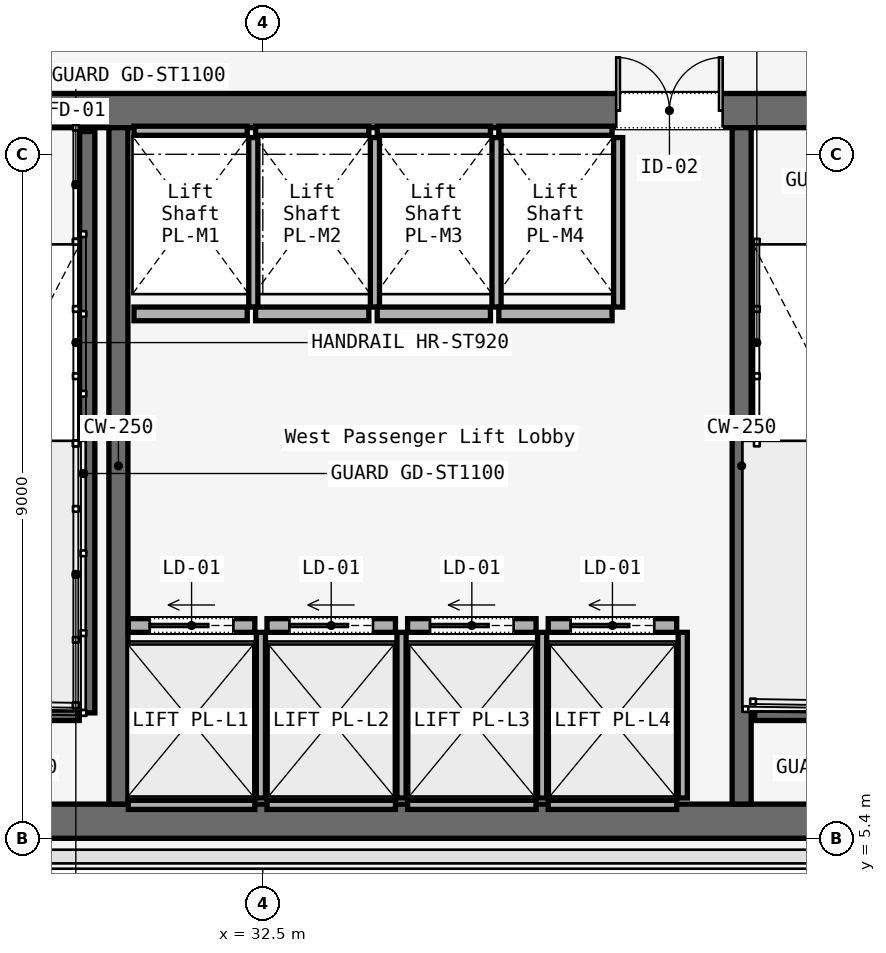
"""IFC4 building model, lengths in metres.
Left out: names, types, materials, properties, quantities, classifications, styles, units other than length and angle.
Written with IfcOpenShell. Run it as: python <this file> out.ifc"""

import sys

from ifc_helpers import new_model, si_unit, direction, frame, frame_2d, origin, place, context, subcontext, project, spatial, rectangle, extrude, element, fill, save


model = new_model("IFC4")
c1 = context("Model", 3, precision=1e-05, world=origin(), true_north=direction((0.0, 1.0)))
c2 = subcontext(c1, "Body", "Model", "MODEL_VIEW")
j1 = project(units=[si_unit("LENGTHUNIT", "METRE"), si_unit("PLANEANGLEUNIT", "RADIAN")], contexts=[c1])
p1 = place(None, origin())
s1 = spatial("IfcSite", under=j1, at=p1, CompositionType="ELEMENT")
p2 = place(p1, origin())
s2 = spatial("IfcBuilding", under=s1, at=p2, CompositionType="ELEMENT")
p3 = place(p2, frame((0.0, 0.0, 85.4)))
s3 = spatial("IfcBuildingStorey", under=s2, at=p3, CompositionType="ELEMENT", Elevation=85.4)
p4 = place(p3, frame((26.45, 14.975, 0.0), z_axis=(0.0, 0.0, 1.0), x_axis=(1.0, 0.0, 0.0)))
e1 = element("IfcWall", 1, at=p4, inside=s3, PredefinedType="SOLIDWALL", context=c2, shape_type="SweptSolid", body=[
    extrude(rectangle(XDim=31.1, YDim=0.45, at=frame_2d((15.55, 0.0))), origin(), (0.0, 0.0, 1.0), 3.58),
])
p5 = place(p4, frame((1.65, 0.0, 0.0)))
e2 = element("IfcOpeningElement", 2, at=p5, cuts=e1, PredefinedType="OPENING", context=c2, shape_type="SweptSolid", body=[
    extrude(rectangle(XDim=1.1, YDim=2.2, at=frame_2d((0.55, 1.1))), frame((0.0, 0.225, 0.0), z_axis=(0.0, -1.0, 0.0), x_axis=(1.0, 0.0, 0.0)), (0.0, 0.0, 1.0), 0.45),
])
p6 = place(p4, frame((13.65, 0.0, 0.0)))
e3 = element("IfcOpeningElement", 3, at=p6, cuts=e1, PredefinedType="OPENING", context=c2, shape_type="SweptSolid", body=[
    extrude(rectangle(XDim=1.1, YDim=2.2, at=frame_2d((0.55, 1.1))), frame((0.0, 0.225, 0.0), z_axis=(0.0, -1.0, 0.0), x_axis=(1.0, 0.0, 0.0)), (0.0, 0.0, 1.0), 0.45),
])
p7 = place(p4, frame((25.55, 0.0, 0.0)))
e4 = element("IfcOpeningElement", 4, at=p7, cuts=e1, PredefinedType="OPENING", context=c2, shape_type="SweptSolid", body=[
    extrude(rectangle(XDim=1.1, YDim=2.2, at=frame_2d((0.55, 1.1))), frame((0.0, 0.225, 0.0), z_axis=(0.0, -1.0, 0.0), x_axis=(1.0, 0.0, 0.0)), (0.0, 0.0, 1.0), 0.45),
])
p8 = place(p4, frame((10.7, 0.0, 0.0)))
e5 = element("IfcOpeningElement", 5, at=p8, cuts=e1, PredefinedType="OPENING", context=c2, shape_type="SweptSolid", body=[
    extrude(rectangle(XDim=1.4, YDim=2.2, at=frame_2d((0.7, 1.1))), frame((0.0, 0.225, 0.0), z_axis=(0.0, -1.0, 0.0), x_axis=(1.0, 0.0, 0.0)), (0.0, 0.0, 1.0), 0.45),
])
p9 = place(p4, frame((19.35, 0.0, 0.0)))
e6 = element("IfcOpeningElement", 6, at=p9, cuts=e1, PredefinedType="OPENING", context=c2, shape_type="SweptSolid", body=[
    extrude(rectangle(XDim=1.1, YDim=2.2, at=frame_2d((0.55, 1.1))), frame((0.0, 0.225, 0.0), z_axis=(0.0, -1.0, 0.0), x_axis=(1.0, 0.0, 0.0)), (0.0, 0.0, 1.0), 0.45),
])
p10 = place(p4, frame((21.4, 0.0, 0.0)))
e7 = element("IfcOpeningElement", 7, at=p10, cuts=e1, PredefinedType="OPENING", context=c2, shape_type="SweptSolid", body=[
    extrude(rectangle(XDim=0.9, YDim=2.1, at=frame_2d((0.45, 1.05))), frame((0.0, 0.225, 0.0), z_axis=(0.0, -1.0, 0.0), x_axis=(1.0, 0.0, 0.0)), (0.0, 0.0, 1.0), 0.45),
])
p11 = place(p4, frame((23.35, 0.0, 0.0)))
e8 = element("IfcOpeningElement", 8, at=p11, cuts=e1, PredefinedType="OPENING", context=c2, shape_type="SweptSolid", body=[
    extrude(rectangle(XDim=1.3, YDim=2.3, at=frame_2d((0.65, 1.15))), frame((0.0, 0.225, 0.0), z_axis=(0.0, -1.0, 0.0), x_axis=(1.0, 0.0, 0.0)), (0.0, 0.0, 1.0), 0.45),
])
p12 = place(p3, frame((26.45, 5.625, 0.0), z_axis=(0.0, 0.0, 1.0), x_axis=(1.0, 0.0, 0.0)))
e9 = element("IfcWall", 9, at=p12, inside=s3, PredefinedType="SOLIDWALL", context=c2, shape_type="SweptSolid", body=[
    extrude(rectangle(XDim=31.1, YDim=0.45, at=frame_2d((15.55, 0.0))), origin(), (0.0, 0.0, 1.0), 3.58),
])
for number, where, z_axis, x_axis in (
    (10, (30.6, 5.85, 0.0), (0.0, 0.0, 1.0), (0.0, 1.0, 0.0)),
    (11, (38.8, 5.85, 0.0), (0.0, 0.0, 1.0), (0.0, 1.0, 0.0)),
):
    element("IfcWall", number, at=place(p3, frame(where, z_axis=z_axis, x_axis=x_axis)), inside=s3, PredefinedType="SOLIDWALL", context=c2, shape_type="SweptSolid", body=[
        extrude(rectangle(XDim=8.9, YDim=0.25, at=frame_2d((4.45, 0.0))), origin(), (0.0, 0.0, 1.0), 3.58),
    ])
p13 = place(p3, frame((30.19, 14.7, 0.0), z_axis=(0.0, 0.0, 1.0), x_axis=(0.0, -1.0, 0.0)))
e12 = element("IfcWall", 12, at=p13, inside=s3, PredefinedType="SOLIDWALL", context=c2, shape_type="SweptSolid", body=[
    extrude(rectangle(XDim=7.65, YDim=0.2, at=frame_2d((3.825, 0.0))), origin(), (0.0, 0.0, 1.0), 3.8),
])
for number, where, z_axis, x_axis in (
    (13, (26.97, 7.05, 0.0), (0.0, 0.0, 1.0), (1.0, 0.0, 0.0)),
    (14, (38.97, 7.05, 0.0), (0.0, 0.0, 1.0), (1.0, 0.0, 0.0)),
):
    element("IfcWall", number, at=place(p3, frame(where, z_axis=z_axis, x_axis=x_axis)), inside=s3, PredefinedType="SOLIDWALL", context=c2, shape_type="SweptSolid", body=[
        extrude(rectangle(XDim=3.115, YDim=0.2, at=frame_2d((1.558, 0.0))), origin(), (0.0, 0.0, 1.0), 3.8),
    ])
p14 = place(p3, frame((30.73, 8.2, 0.0), z_axis=(0.0, 0.0, 1.0), x_axis=(1.0, 0.0, 0.0)))
e15 = element("IfcWall", 15, at=p14, inside=s3, PredefinedType="SOLIDWALL", context=c2, shape_type="SweptSolid", body=[
    extrude(rectangle(XDim=1.665, YDim=0.18, at=frame_2d((0.833, 0.0))), origin(), (0.0, 0.0, 1.0), 2.95),
])
p15 = place(p14, frame((0.282, 0.0, 0.0)))
e16 = element("IfcOpeningElement", 16, at=p15, cuts=e15, PredefinedType="OPENING", context=c2, shape_type="SweptSolid", body=[
    extrude(rectangle(XDim=1.1, YDim=2.2, at=frame_2d((0.55, 1.1))), frame((0.0, 0.09, 0.0), z_axis=(0.0, -1.0, 0.0), x_axis=(1.0, 0.0, 0.0)), (0.0, 0.0, 1.0), 0.18),
])
p16 = place(p3, frame((30.73, 5.84, 0.0), z_axis=(0.0, 0.0, 1.0), x_axis=(1.0, 0.0, 0.0)))
e17 = element("IfcWall", 17, at=p16, inside=s3, PredefinedType="SOLIDWALL", context=c2, shape_type="SweptSolid", body=[
    extrude(rectangle(XDim=1.665, YDim=0.12, at=frame_2d((0.833, 0.0))), origin(), (0.0, 0.0, 1.0), 2.95),
])
p17 = place(p3, frame((32.475, 5.93, 0.0), z_axis=(0.0, 0.0, 1.0), x_axis=(0.0, 1.0, 0.0)))
e18 = element("IfcWall", 18, at=p17, inside=s3, PredefinedType="SOLIDWALL", context=c2, shape_type="SweptSolid", body=[
    extrude(rectangle(XDim=2.18, YDim=0.12, at=frame_2d((1.09, 0.0))), origin(), (0.0, 0.0, 1.0), 2.95),
])
p18 = place(p3, frame((32.555, 8.2, 0.0), z_axis=(0.0, 0.0, 1.0), x_axis=(1.0, 0.0, 0.0)))
e19 = element("IfcWall", 19, at=p18, inside=s3, PredefinedType="SOLIDWALL", context=c2, shape_type="SweptSolid", body=[
    extrude(rectangle(XDim=1.69, YDim=0.18, at=frame_2d((0.845, 0.0))), origin(), (0.0, 0.0, 1.0), 2.95),
])
p19 = place(p18, frame((0.295, 0.0, 0.0)))
e20 = element("IfcOpeningElement", 20, at=p19, cuts=e19, PredefinedType="OPENING", context=c2, shape_type="SweptSolid", body=[
    extrude(rectangle(XDim=1.1, YDim=2.2, at=frame_2d((0.55, 1.1))), frame((0.0, 0.09, 0.0), z_axis=(0.0, -1.0, 0.0), x_axis=(1.0, 0.0, 0.0)), (0.0, 0.0, 1.0), 0.18),
])
p20 = place(p3, frame((32.555, 5.84, 0.0), z_axis=(0.0, 0.0, 1.0), x_axis=(1.0, 0.0, 0.0)))
e21 = element("IfcWall", 21, at=p20, inside=s3, PredefinedType="SOLIDWALL", context=c2, shape_type="SweptSolid", body=[
    extrude(rectangle(XDim=1.69, YDim=0.12, at=frame_2d((0.845, 0.0))), origin(), (0.0, 0.0, 1.0), 2.95),
])
p21 = place(p3, frame((34.325, 5.93, 0.0), z_axis=(0.0, 0.0, 1.0), x_axis=(0.0, 1.0, 0.0)))
e22 = element("IfcWall", 22, at=p21, inside=s3, PredefinedType="SOLIDWALL", context=c2, shape_type="SweptSolid", body=[
    extrude(rectangle(XDim=2.18, YDim=0.12, at=frame_2d((1.09, 0.0))), origin(), (0.0, 0.0, 1.0), 2.95),
])
p22 = place(p3, frame((34.405, 8.2, 0.0), z_axis=(0.0, 0.0, 1.0), x_axis=(1.0, 0.0, 0.0)))
e23 = element("IfcWall", 23, at=p22, inside=s3, PredefinedType="SOLIDWALL", context=c2, shape_type="SweptSolid", body=[
    extrude(rectangle(XDim=1.69, YDim=0.18, at=frame_2d((0.845, 0.0))), origin(), (0.0, 0.0, 1.0), 2.95),
])
p23 = place(p22, frame((0.295, 0.0, 0.0)))
e24 = element("IfcOpeningElement", 24, at=p23, cuts=e23, PredefinedType="OPENING", context=c2, shape_type="SweptSolid", body=[
    extrude(rectangle(XDim=1.1, YDim=2.2, at=frame_2d((0.55, 1.1))), frame((0.0, 0.09, 0.0), z_axis=(0.0, -1.0, 0.0), x_axis=(1.0, 0.0, 0.0)), (0.0, 0.0, 1.0), 0.18),
])
p24 = place(p3, frame((34.405, 5.84, 0.0), z_axis=(0.0, 0.0, 1.0), x_axis=(1.0, 0.0, 0.0)))
e25 = element("IfcWall", 25, at=p24, inside=s3, PredefinedType="SOLIDWALL", context=c2, shape_type="SweptSolid", body=[
    extrude(rectangle(XDim=1.69, YDim=0.12, at=frame_2d((0.845, 0.0))), origin(), (0.0, 0.0, 1.0), 2.95),
])
p25 = place(p3, frame((36.175, 5.93, 0.0), z_axis=(0.0, 0.0, 1.0), x_axis=(0.0, 1.0, 0.0)))
e26 = element("IfcWall", 26, at=p25, inside=s3, PredefinedType="SOLIDWALL", context=c2, shape_type="SweptSolid", body=[
    extrude(rectangle(XDim=2.18, YDim=0.12, at=frame_2d((1.09, 0.0))), origin(), (0.0, 0.0, 1.0), 2.95),
])
p26 = place(p3, frame((36.255, 8.2, 0.0), z_axis=(0.0, 0.0, 1.0), x_axis=(1.0, 0.0, 0.0)))
e27 = element("IfcWall", 27, at=p26, inside=s3, PredefinedType="SOLIDWALL", context=c2, shape_type="SweptSolid", body=[
    extrude(rectangle(XDim=1.69, YDim=0.18, at=frame_2d((0.845, 0.0))), origin(), (0.0, 0.0, 1.0), 2.95),
])
p27 = place(p26, frame((0.295, 0.0, 0.0)))
e28 = element("IfcOpeningElement", 28, at=p27, cuts=e27, PredefinedType="OPENING", context=c2, shape_type="SweptSolid", body=[
    extrude(rectangle(XDim=1.1, YDim=2.2, at=frame_2d((0.55, 1.1))), frame((0.0, 0.09, 0.0), z_axis=(0.0, -1.0, 0.0), x_axis=(1.0, 0.0, 0.0)), (0.0, 0.0, 1.0), 0.18),
])
p28 = place(p3, frame((36.255, 5.84, 0.0), z_axis=(0.0, 0.0, 1.0), x_axis=(1.0, 0.0, 0.0)))
e29 = element("IfcWall", 29, at=p28, inside=s3, PredefinedType="SOLIDWALL", context=c2, shape_type="SweptSolid", body=[
    extrude(rectangle(XDim=1.69, YDim=0.12, at=frame_2d((0.845, 0.0))), origin(), (0.0, 0.0, 1.0), 2.95),
])
p29 = place(p3, frame((38.025, 5.93, 0.0), z_axis=(0.0, 0.0, 1.0), x_axis=(0.0, 1.0, 0.0)))
e30 = element("IfcWall", 30, at=p29, inside=s3, PredefinedType="SOLIDWALL", context=c2, shape_type="SweptSolid", body=[
    extrude(rectangle(XDim=2.18, YDim=0.12, at=frame_2d((1.09, 0.0))), origin(), (0.0, 0.0, 1.0), 2.95),
])
p30 = place(p3, frame((30.805, 12.3, 0.0), z_axis=(0.0, 0.0, 1.0), x_axis=(1.0, 0.0, 0.0)))
e31 = element("IfcWall", 31, at=p30, inside=s3, PredefinedType="SOLIDWALL", context=c2, shape_type="SweptSolid", body=[
    extrude(rectangle(XDim=1.49, YDim=0.18, at=frame_2d((0.745, 0.0))), origin(), (0.0, 0.0, 1.0), 2.95),
])
p31 = place(p3, frame((30.805, 14.71, 0.0), z_axis=(0.0, 0.0, 1.0), x_axis=(1.0, 0.0, 0.0)))
e32 = element("IfcWall", 32, at=p31, inside=s3, PredefinedType="SOLIDWALL", context=c2, shape_type="SweptSolid", body=[
    extrude(rectangle(XDim=1.49, YDim=0.12, at=frame_2d((0.745, 0.0))), origin(), (0.0, 0.0, 1.0), 2.95),
])
p32 = place(p3, frame((32.375, 12.39, 0.0), z_axis=(0.0, 0.0, 1.0), x_axis=(0.0, 1.0, 0.0)))
e33 = element("IfcWall", 33, at=p32, inside=s3, PredefinedType="SOLIDWALL", context=c2, shape_type="SweptSolid", body=[
    extrude(rectangle(XDim=2.23, YDim=0.12, at=frame_2d((1.115, 0.0))), origin(), (0.0, 0.0, 1.0), 2.95),
])
p33 = place(p3, frame((32.405, 12.3, 0.0), z_axis=(0.0, 0.0, 1.0), x_axis=(1.0, 0.0, 0.0)))
e34 = element("IfcWall", 34, at=p33, inside=s3, PredefinedType="SOLIDWALL", context=c2, shape_type="SweptSolid", body=[
    extrude(rectangle(XDim=1.49, YDim=0.18, at=frame_2d((0.745, 0.0))), origin(), (0.0, 0.0, 1.0), 2.95),
])
p34 = place(p3, frame((32.405, 14.71, 0.0), z_axis=(0.0, 0.0, 1.0), x_axis=(1.0, 0.0, 0.0)))
e35 = element("IfcWall", 35, at=p34, inside=s3, PredefinedType="SOLIDWALL", context=c2, shape_type="SweptSolid", body=[
    extrude(rectangle(XDim=1.49, YDim=0.12, at=frame_2d((0.745, 0.0))), origin(), (0.0, 0.0, 1.0), 2.95),
])
p35 = place(p3, frame((33.975, 12.39, 0.0), z_axis=(0.0, 0.0, 1.0), x_axis=(0.0, 1.0, 0.0)))
e36 = element("IfcWall", 36, at=p35, inside=s3, PredefinedType="SOLIDWALL", context=c2, shape_type="SweptSolid", body=[
    extrude(rectangle(XDim=2.23, YDim=0.12, at=frame_2d((1.115, 0.0))), origin(), (0.0, 0.0, 1.0), 2.95),
])
p36 = place(p3, frame((34.005, 12.3, 0.0), z_axis=(0.0, 0.0, 1.0), x_axis=(1.0, 0.0, 0.0)))
e37 = element("IfcWall", 37, at=p36, inside=s3, PredefinedType="SOLIDWALL", context=c2, shape_type="SweptSolid", body=[
    extrude(rectangle(XDim=1.49, YDim=0.18, at=frame_2d((0.745, 0.0))), origin(), (0.0, 0.0, 1.0), 2.95),
])
p37 = place(p3, frame((34.005, 14.71, 0.0), z_axis=(0.0, 0.0, 1.0), x_axis=(1.0, 0.0, 0.0)))
e38 = element("IfcWall", 38, at=p37, inside=s3, PredefinedType="SOLIDWALL", context=c2, shape_type="SweptSolid", body=[
    extrude(rectangle(XDim=1.49, YDim=0.12, at=frame_2d((0.745, 0.0))), origin(), (0.0, 0.0, 1.0), 2.95),
])
p38 = place(p3, frame((35.575, 12.39, 0.0), z_axis=(0.0, 0.0, 1.0), x_axis=(0.0, 1.0, 0.0)))
e39 = element("IfcWall", 39, at=p38, inside=s3, PredefinedType="SOLIDWALL", context=c2, shape_type="SweptSolid", body=[
    extrude(rectangle(XDim=2.23, YDim=0.12, at=frame_2d((1.115, 0.0))), origin(), (0.0, 0.0, 1.0), 2.95),
])
p39 = place(p3, frame((35.605, 12.3, 0.0), z_axis=(0.0, 0.0, 1.0), x_axis=(1.0, 0.0, 0.0)))
e40 = element("IfcWall", 40, at=p39, inside=s3, PredefinedType="SOLIDWALL", context=c2, shape_type="SweptSolid", body=[
    extrude(rectangle(XDim=1.49, YDim=0.18, at=frame_2d((0.745, 0.0))), origin(), (0.0, 0.0, 1.0), 2.95),
])
p40 = place(p3, frame((35.605, 14.71, 0.0), z_axis=(0.0, 0.0, 1.0), x_axis=(1.0, 0.0, 0.0)))
e41 = element("IfcWall", 41, at=p40, inside=s3, PredefinedType="SOLIDWALL", context=c2, shape_type="SweptSolid", body=[
    extrude(rectangle(XDim=1.49, YDim=0.12, at=frame_2d((0.745, 0.0))), origin(), (0.0, 0.0, 1.0), 2.95),
])
p41 = place(p3, frame((37.175, 12.39, 0.0), z_axis=(0.0, 0.0, 1.0), x_axis=(0.0, 1.0, 0.0)))
e42 = element("IfcWall", 42, at=p41, inside=s3, PredefinedType="SOLIDWALL", context=c2, shape_type="SweptSolid", body=[
    extrude(rectangle(XDim=2.23, YDim=0.12, at=frame_2d((1.115, 0.0))), origin(), (0.0, 0.0, 1.0), 2.95),
])
p42 = place(p8, origin())
e43 = element("IfcDoor", 43, at=p42, inside=s3, OperationType="DOUBLE_DOOR_SINGLE_SWING", PredefinedType="DOOR", context=c2, shape_type="SweptSolid", body=[
    extrude(rectangle(XDim=1.4, YDim=2.2, at=frame_2d((0.7, 1.1))), frame((0.0, 0.025, 0.0), z_axis=(0.0, -1.0, 0.0), x_axis=(1.0, 0.0, 0.0)), (0.0, 0.0, 1.0), 0.05),
])
fill(e5, e43)
p43 = place(p15, origin())
e44 = element("IfcDoor", 44, at=p43, inside=s3, OperationType="SLIDING_TO_LEFT", PredefinedType="DOOR", context=c2, shape_type="SweptSolid", body=[
    extrude(rectangle(XDim=1.1, YDim=2.2, at=frame_2d((0.55, 1.1))), frame((0.0, 0.025, 0.0), z_axis=(0.0, -1.0, 0.0), x_axis=(1.0, 0.0, 0.0)), (0.0, 0.0, 1.0), 0.05),
])
fill(e16, e44)
p44 = place(p19, origin())
e45 = element("IfcDoor", 45, at=p44, inside=s3, OperationType="SLIDING_TO_LEFT", PredefinedType="DOOR", context=c2, shape_type="SweptSolid", body=[
    extrude(rectangle(XDim=1.1, YDim=2.2, at=frame_2d((0.55, 1.1))), frame((0.0, 0.025, 0.0), z_axis=(0.0, -1.0, 0.0), x_axis=(1.0, 0.0, 0.0)), (0.0, 0.0, 1.0), 0.05),
])
fill(e20, e45)
p45 = place(p23, origin())
e46 = element("IfcDoor", 46, at=p45, inside=s3, OperationType="SLIDING_TO_LEFT", PredefinedType="DOOR", context=c2, shape_type="SweptSolid", body=[
    extrude(rectangle(XDim=1.1, YDim=2.2, at=frame_2d((0.55, 1.1))), frame((0.0, 0.025, 0.0), z_axis=(0.0, -1.0, 0.0), x_axis=(1.0, 0.0, 0.0)), (0.0, 0.0, 1.0), 0.05),
])
fill(e24, e46)
p46 = place(p27, origin())
e47 = element("IfcDoor", 47, at=p46, inside=s3, OperationType="SLIDING_TO_LEFT", PredefinedType="DOOR", context=c2, shape_type="SweptSolid", body=[
    extrude(rectangle(XDim=1.1, YDim=2.2, at=frame_2d((0.55, 1.1))), frame((0.0, 0.025, 0.0), z_axis=(0.0, -1.0, 0.0), x_axis=(1.0, 0.0, 0.0)), (0.0, 0.0, 1.0), 0.05),
])
fill(e28, e47)
save(model, sys.argv[1])
